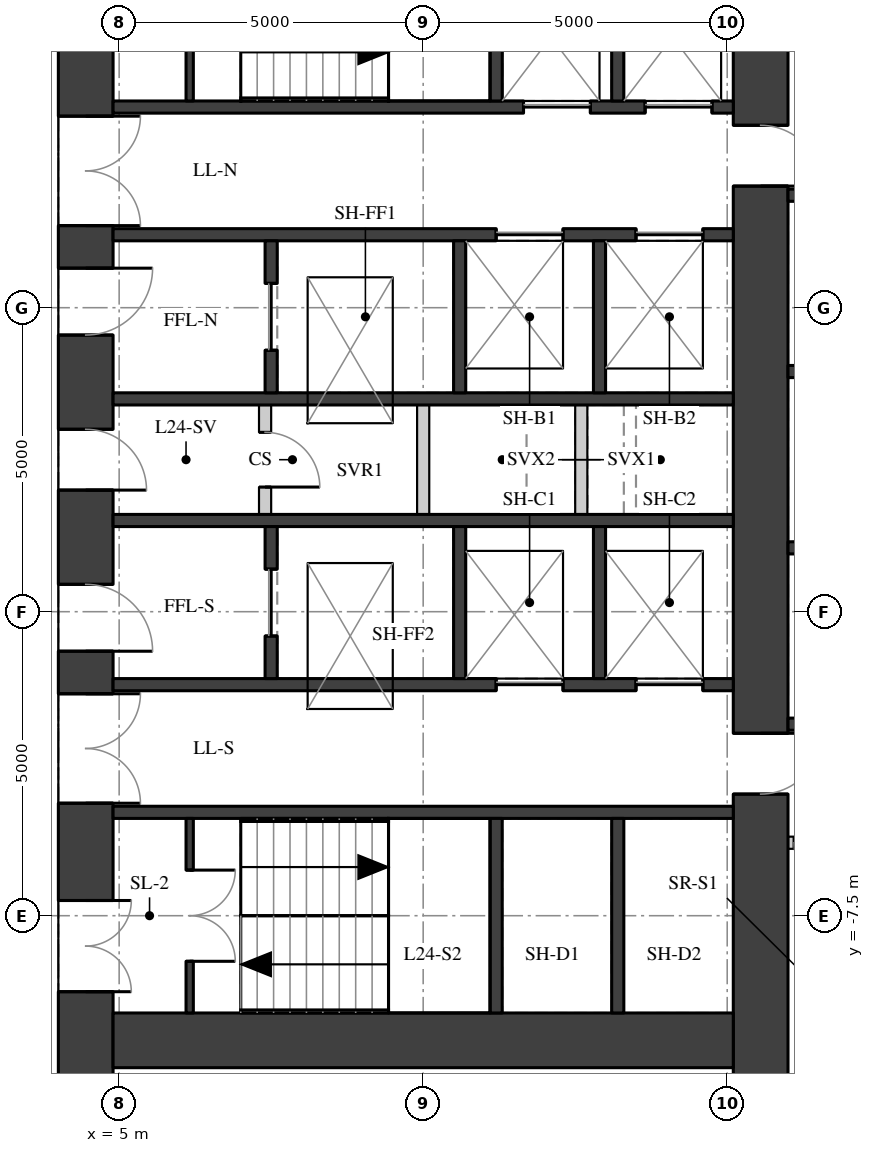
"""IFC4 building model, lengths in metres.
Left out: names, types, materials, properties, quantities, classifications, styles, units other than length and angle.
Written with IfcOpenShell. Run it as: python <this file> out.ifc"""

import sys

from ifc_helpers import new_model, si_unit, direction, frame, frame_2d, origin, place, context, subcontext, project, spatial, rectangle, extrude, element, fill, save


model = new_model("IFC4")
c1 = context("Model", 3, precision=1e-05, world=origin(), true_north=direction((0.0, 1.0)))
c2 = subcontext(c1, "Body", "Model", "MODEL_VIEW")
j1 = project(units=[si_unit("LENGTHUNIT", "METRE"), si_unit("PLANEANGLEUNIT", "RADIAN")], contexts=[c1])
p1 = place(None, origin())
s1 = spatial("IfcSite", under=j1, at=p1, CompositionType="ELEMENT")
p2 = place(p1, origin())
s2 = spatial("IfcBuilding", under=s1, at=p2, CompositionType="ELEMENT")
p3 = place(p2, frame((0.0, 0.0, 88.9)))
s3 = spatial("IfcBuildingStorey", under=s2, at=p3, CompositionType="ELEMENT", Elevation=88.9)
p4 = place(p3, frame((4.45, -11.1, 0.0), z_axis=(0.0, 0.0, 1.0), x_axis=(0.0, 1.0, 0.0)))
e1 = element("IfcWall", 1, at=p4, inside=s3, PredefinedType="SHEAR", context=c2, shape_type="SweptSolid", body=[
    extrude(rectangle(XDim=22.2, YDim=0.9, at=frame_2d((11.1, 0.0))), origin(), (0.0, 0.0, 1.0), 3.02),
])
p5 = place(p4, frame((2.35, 0.0, 0.0)))
e2 = element("IfcOpeningElement", 2, at=p5, cuts=e1, PredefinedType="OPENING", context=c2, shape_type="SweptSolid", body=[
    extrude(rectangle(XDim=1.5, YDim=2.1, at=frame_2d((0.75, 1.05))), frame((0.0, 0.46, 0.0), z_axis=(0.0, -1.0, 0.0), x_axis=(1.0, 0.0, 0.0)), (0.0, 0.0, 1.0), 0.92),
])
p6 = place(p4, frame((5.45, 0.0, 0.0)))
e3 = element("IfcOpeningElement", 3, at=p6, cuts=e1, PredefinedType="OPENING", context=c2, shape_type="SweptSolid", body=[
    extrude(rectangle(XDim=1.8, YDim=2.1, at=frame_2d((0.9, 1.05))), frame((0.0, 0.46, 0.0), z_axis=(0.0, -1.0, 0.0), x_axis=(1.0, 0.0, 0.0)), (0.0, 0.0, 1.0), 0.92),
])
p7 = place(p4, frame((7.95, 0.0, 0.0)))
e4 = element("IfcOpeningElement", 4, at=p7, cuts=e1, PredefinedType="OPENING", context=c2, shape_type="SweptSolid", body=[
    extrude(rectangle(XDim=1.1, YDim=2.1, at=frame_2d((0.55, 1.05))), frame((0.0, 0.46, 0.0), z_axis=(0.0, -1.0, 0.0), x_axis=(1.0, 0.0, 0.0)), (0.0, 0.0, 1.0), 0.92),
])
p8 = place(p4, frame((10.6, 0.0, 0.0)))
e5 = element("IfcOpeningElement", 5, at=p8, cuts=e1, PredefinedType="OPENING", context=c2, shape_type="SweptSolid", body=[
    extrude(rectangle(XDim=1.0, YDim=2.1, at=frame_2d((0.5, 1.05))), frame((0.0, 0.46, 0.0), z_axis=(0.0, -1.0, 0.0), x_axis=(1.0, 0.0, 0.0)), (0.0, 0.0, 1.0), 0.92),
])
p9 = place(p4, frame((13.15, 0.0, 0.0)))
e6 = element("IfcOpeningElement", 6, at=p9, cuts=e1, PredefinedType="OPENING", context=c2, shape_type="SweptSolid", body=[
    extrude(rectangle(XDim=1.1, YDim=2.1, at=frame_2d((0.55, 1.05))), frame((0.0, 0.46, 0.0), z_axis=(0.0, -1.0, 0.0), x_axis=(1.0, 0.0, 0.0)), (0.0, 0.0, 1.0), 0.92),
])
p10 = place(p4, frame((14.95, 0.0, 0.0)))
e7 = element("IfcOpeningElement", 7, at=p10, cuts=e1, PredefinedType="OPENING", context=c2, shape_type="SweptSolid", body=[
    extrude(rectangle(XDim=1.8, YDim=2.1, at=frame_2d((0.9, 1.05))), frame((0.0, 0.46, 0.0), z_axis=(0.0, -1.0, 0.0), x_axis=(1.0, 0.0, 0.0)), (0.0, 0.0, 1.0), 0.92),
])
p11 = place(p4, frame((18.35, 0.0, 0.0)))
e8 = element("IfcOpeningElement", 8, at=p11, cuts=e1, PredefinedType="OPENING", context=c2, shape_type="SweptSolid", body=[
    extrude(rectangle(XDim=1.5, YDim=2.1, at=frame_2d((0.75, 1.05))), frame((0.0, 0.46, 0.0), z_axis=(0.0, -1.0, 0.0), x_axis=(1.0, 0.0, 0.0)), (0.0, 0.0, 1.0), 0.92),
])
p12 = place(p3, frame((15.55, -11.1, 0.0), z_axis=(0.0, 0.0, 1.0), x_axis=(0.0, 1.0, 0.0)))
e9 = element("IfcWall", 9, at=p12, inside=s3, PredefinedType="SHEAR", context=c2, shape_type="SweptSolid", body=[
    extrude(rectangle(XDim=22.2, YDim=0.9, at=frame_2d((11.1, 0.0))), origin(), (0.0, 0.0, 1.0), 3.02),
])
p13 = place(p12, frame((15.6, 0.0, 0.0)))
e10 = element("IfcOpeningElement", 10, at=p13, cuts=e9, PredefinedType="OPENING", context=c2, shape_type="SweptSolid", body=[
    extrude(rectangle(XDim=1.0, YDim=2.1, at=frame_2d((0.5, 1.05))), frame((0.0, 0.46, 0.0), z_axis=(0.0, -1.0, 0.0), x_axis=(1.0, 0.0, 0.0)), (0.0, 0.0, 1.0), 0.92),
])
p14 = place(p12, frame((5.6, 0.0, 0.0)))
e11 = element("IfcOpeningElement", 11, at=p14, cuts=e9, PredefinedType="OPENING", context=c2, shape_type="SweptSolid", body=[
    extrude(rectangle(XDim=1.0, YDim=2.1, at=frame_2d((0.5, 1.05))), frame((0.0, 0.46, 0.0), z_axis=(0.0, -1.0, 0.0), x_axis=(1.0, 0.0, 0.0)), (0.0, 0.0, 1.0), 0.92),
])
p15 = place(p3, frame((4.9, -9.55, 0.0), z_axis=(0.0, 0.0, 1.0), x_axis=(1.0, 0.0, 0.0)))
e12 = element("IfcWall", 12, at=p15, inside=s3, PredefinedType="SHEAR", context=c2, shape_type="SweptSolid", body=[
    extrude(rectangle(XDim=10.2, YDim=0.9, at=frame_2d((5.1, 0.0))), origin(), (0.0, 0.0, 1.0), 3.02),
])
p16 = place(p3, frame((4.9, 5.8, 0.0), z_axis=(0.0, 0.0, 1.0), x_axis=(1.0, 0.0, 0.0)))
e13 = element("IfcWall", 13, at=p16, inside=s3, PredefinedType="SHEAR", context=c2, shape_type="SweptSolid", body=[
    extrude(rectangle(XDim=10.2, YDim=0.2, at=frame_2d((5.1, 0.0))), origin(), (0.0, 0.0, 1.0), 3.02),
])
p17 = place(p16, frame((6.75, 0.0, 0.0)))
e14 = element("IfcOpeningElement", 14, at=p17, cuts=e13, PredefinedType="OPENING", context=c2, shape_type="SweptSolid", body=[
    extrude(rectangle(XDim=1.1, YDim=2.1, at=frame_2d((0.55, 1.05))), frame((0.0, 0.11, 0.0), z_axis=(0.0, -1.0, 0.0), x_axis=(1.0, 0.0, 0.0)), (0.0, 0.0, 1.0), 0.22),
])
p18 = place(p16, frame((8.75, 0.0, 0.0)))
e15 = element("IfcOpeningElement", 15, at=p18, cuts=e13, PredefinedType="OPENING", context=c2, shape_type="SweptSolid", body=[
    extrude(rectangle(XDim=1.1, YDim=2.1, at=frame_2d((0.55, 1.05))), frame((0.0, 0.11, 0.0), z_axis=(0.0, -1.0, 0.0), x_axis=(1.0, 0.0, 0.0)), (0.0, 0.0, 1.0), 0.22),
])
p19 = place(p3, frame((4.9, 3.7, 0.0), z_axis=(0.0, 0.0, 1.0), x_axis=(1.0, 0.0, 0.0)))
e16 = element("IfcWall", 16, at=p19, inside=s3, PredefinedType="SHEAR", context=c2, shape_type="SweptSolid", body=[
    extrude(rectangle(XDim=10.2, YDim=0.2, at=frame_2d((5.1, 0.0))), origin(), (0.0, 0.0, 1.0), 3.02),
])
p20 = place(p19, frame((6.3, 0.0, 0.0)))
e17 = element("IfcOpeningElement", 17, at=p20, cuts=e16, PredefinedType="OPENING", context=c2, shape_type="SweptSolid", body=[
    extrude(rectangle(XDim=1.1, YDim=2.1, at=frame_2d((0.55, 1.05))), frame((0.0, 0.11, 0.0), z_axis=(0.0, -1.0, 0.0), x_axis=(1.0, 0.0, 0.0)), (0.0, 0.0, 1.0), 0.22),
])
p21 = place(p19, frame((8.6, 0.0, 0.0)))
e18 = element("IfcOpeningElement", 18, at=p21, cuts=e16, PredefinedType="OPENING", context=c2, shape_type="SweptSolid", body=[
    extrude(rectangle(XDim=1.1, YDim=2.1, at=frame_2d((0.55, 1.05))), frame((0.0, 0.11, 0.0), z_axis=(0.0, -1.0, 0.0), x_axis=(1.0, 0.0, 0.0)), (0.0, 0.0, 1.0), 0.22),
])
for number, where, z_axis, x_axis in (
    (19, (4.9, 1.0, 0.0), (0.0, 0.0, 1.0), (1.0, 0.0, 0.0)),
    (20, (4.9, -1.0, 0.0), (0.0, 0.0, 1.0), (1.0, 0.0, 0.0)),
):
    element("IfcWall", number, at=place(p3, frame(where, z_axis=z_axis, x_axis=x_axis)), inside=s3, PredefinedType="SHEAR", context=c2, shape_type="SweptSolid", body=[
        extrude(rectangle(XDim=10.2, YDim=0.2, at=frame_2d((5.1, 0.0))), origin(), (0.0, 0.0, 1.0), 3.02),
    ])
p22 = place(p3, frame((4.9, -3.7, 0.0), z_axis=(0.0, 0.0, 1.0), x_axis=(1.0, 0.0, 0.0)))
e21 = element("IfcWall", 21, at=p22, inside=s3, PredefinedType="SHEAR", context=c2, shape_type="SweptSolid", body=[
    extrude(rectangle(XDim=10.2, YDim=0.2, at=frame_2d((5.1, 0.0))), origin(), (0.0, 0.0, 1.0), 3.02),
])
p23 = place(p22, frame((6.3, 0.0, 0.0)))
e22 = element("IfcOpeningElement", 22, at=p23, cuts=e21, PredefinedType="OPENING", context=c2, shape_type="SweptSolid", body=[
    extrude(rectangle(XDim=1.1, YDim=2.1, at=frame_2d((0.55, 1.05))), frame((0.0, 0.11, 0.0), z_axis=(0.0, -1.0, 0.0), x_axis=(1.0, 0.0, 0.0)), (0.0, 0.0, 1.0), 0.22),
])
p24 = place(p22, frame((8.6, 0.0, 0.0)))
e23 = element("IfcOpeningElement", 23, at=p24, cuts=e21, PredefinedType="OPENING", context=c2, shape_type="SweptSolid", body=[
    extrude(rectangle(XDim=1.1, YDim=2.1, at=frame_2d((0.55, 1.05))), frame((0.0, 0.11, 0.0), z_axis=(0.0, -1.0, 0.0), x_axis=(1.0, 0.0, 0.0)), (0.0, 0.0, 1.0), 0.22),
])
p25 = place(p3, frame((4.9, -5.8, 0.0), z_axis=(0.0, 0.0, 1.0), x_axis=(1.0, 0.0, 0.0)))
e24 = element("IfcWall", 24, at=p25, inside=s3, PredefinedType="SHEAR", context=c2, shape_type="SweptSolid", body=[
    extrude(rectangle(XDim=10.2, YDim=0.2, at=frame_2d((5.1, 0.0))), origin(), (0.0, 0.0, 1.0), 3.02),
])
for number, where, z_axis, x_axis in (
    (25, (11.2, 5.9, 0.0), (0.0, 0.0, 1.0), (0.0, 1.0, 0.0)),
    (26, (11.2, -9.1, 0.0), (0.0, 0.0, 1.0), (0.0, 1.0, 0.0)),
    (27, (13.2, 5.9, 0.0), (0.0, 0.0, 1.0), (0.0, 1.0, 0.0)),
    (28, (13.2, -9.1, 0.0), (0.0, 0.0, 1.0), (0.0, 1.0, 0.0)),
):
    element("IfcWall", number, at=place(p3, frame(where, z_axis=z_axis, x_axis=x_axis)), inside=s3, PredefinedType="SHEAR", context=c2, shape_type="SweptSolid", body=[
        extrude(rectangle(XDim=3.2, YDim=0.2, at=frame_2d((1.6, 0.0))), origin(), (0.0, 0.0, 1.0), 3.02),
    ])
p26 = place(p3, frame((7.5, 1.1, 0.0), z_axis=(0.0, 0.0, 1.0), x_axis=(0.0, 1.0, 0.0)))
e29 = element("IfcWall", 29, at=p26, inside=s3, PredefinedType="SHEAR", context=c2, shape_type="SweptSolid", body=[
    extrude(rectangle(XDim=2.5, YDim=0.2, at=frame_2d((1.25, 0.0))), origin(), (0.0, 0.0, 1.0), 3.02),
])
p27 = place(p26, frame((0.7, 0.0, 0.0)))
e30 = element("IfcOpeningElement", 30, at=p27, cuts=e29, PredefinedType="OPENING", context=c2, shape_type="SweptSolid", body=[
    extrude(rectangle(XDim=1.1, YDim=2.1, at=frame_2d((0.55, 1.05))), frame((0.0, 0.11, 0.0), z_axis=(0.0, -1.0, 0.0), x_axis=(1.0, 0.0, 0.0)), (0.0, 0.0, 1.0), 0.22),
])
p28 = place(p3, frame((7.5, -3.6, 0.0), z_axis=(0.0, 0.0, 1.0), x_axis=(0.0, 1.0, 0.0)))
e31 = element("IfcWall", 31, at=p28, inside=s3, PredefinedType="SHEAR", context=c2, shape_type="SweptSolid", body=[
    extrude(rectangle(XDim=2.5, YDim=0.2, at=frame_2d((1.25, 0.0))), origin(), (0.0, 0.0, 1.0), 3.02),
])
p29 = place(p28, frame((0.7, 0.0, 0.0)))
e32 = element("IfcOpeningElement", 32, at=p29, cuts=e31, PredefinedType="OPENING", context=c2, shape_type="SweptSolid", body=[
    extrude(rectangle(XDim=1.1, YDim=2.1, at=frame_2d((0.55, 1.05))), frame((0.0, 0.11, 0.0), z_axis=(0.0, -1.0, 0.0), x_axis=(1.0, 0.0, 0.0)), (0.0, 0.0, 1.0), 0.22),
])
for number, where, z_axis, x_axis in (
    (33, (10.6, 1.1, 0.0), (0.0, 0.0, 1.0), (0.0, 1.0, 0.0)),
    (34, (10.6, -3.6, 0.0), (0.0, 0.0, 1.0), (0.0, 1.0, 0.0)),
    (35, (12.9, 1.1, 0.0), (0.0, 0.0, 1.0), (0.0, 1.0, 0.0)),
    (36, (12.9, -3.6, 0.0), (0.0, 0.0, 1.0), (0.0, 1.0, 0.0)),
):
    element("IfcWall", number, at=place(p3, frame(where, z_axis=z_axis, x_axis=x_axis)), inside=s3, PredefinedType="SHEAR", context=c2, shape_type="SweptSolid", body=[
        extrude(rectangle(XDim=2.5, YDim=0.2, at=frame_2d((1.25, 0.0))), origin(), (0.0, 0.0, 1.0), 3.02),
    ])
p30 = place(p3, frame((6.16, 5.9, 0.0), z_axis=(0.0, 0.0, 1.0), x_axis=(0.0, 1.0, 0.0)))
e37 = element("IfcWall", 37, at=p30, inside=s3, PredefinedType="SHEAR", context=c2, shape_type="SweptSolid", body=[
    extrude(rectangle(XDim=3.2, YDim=0.12, at=frame_2d((1.6, 0.0))), origin(), (0.0, 0.0, 1.0), 3.02),
])
p31 = place(p30, frame((0.85, 0.0, 0.0)))
e38 = element("IfcOpeningElement", 38, at=p31, cuts=e37, PredefinedType="OPENING", context=c2, shape_type="SweptSolid", body=[
    extrude(rectangle(XDim=1.5, YDim=2.1, at=frame_2d((0.75, 1.05))), frame((0.0, 0.07, 0.0), z_axis=(0.0, -1.0, 0.0), x_axis=(1.0, 0.0, 0.0)), (0.0, 0.0, 1.0), 0.14),
])
p32 = place(p3, frame((6.16, -9.1, 0.0), z_axis=(0.0, 0.0, 1.0), x_axis=(0.0, 1.0, 0.0)))
e39 = element("IfcWall", 39, at=p32, inside=s3, PredefinedType="SHEAR", context=c2, shape_type="SweptSolid", body=[
    extrude(rectangle(XDim=3.2, YDim=0.12, at=frame_2d((1.6, 0.0))), origin(), (0.0, 0.0, 1.0), 3.02),
])
p33 = place(p32, frame((0.85, 0.0, 0.0)))
e40 = element("IfcOpeningElement", 40, at=p33, cuts=e39, PredefinedType="OPENING", context=c2, shape_type="SweptSolid", body=[
    extrude(rectangle(XDim=1.5, YDim=2.1, at=frame_2d((0.75, 1.05))), frame((0.0, 0.07, 0.0), z_axis=(0.0, -1.0, 0.0), x_axis=(1.0, 0.0, 0.0)), (0.0, 0.0, 1.0), 0.14),
])
p34 = place(p3, frame((7.4, -0.9, 0.0), z_axis=(0.0, 0.0, 1.0), x_axis=(0.0, 1.0, 0.0)))
e41 = element("IfcWall", 41, at=p34, inside=s3, PredefinedType="PARTITIONING", context=c2, shape_type="SweptSolid", body=[
    extrude(rectangle(XDim=1.8, YDim=0.2, at=frame_2d((0.9, 0.0))), origin(), (0.0, 0.0, 1.0), 3.02),
])
p35 = place(p34, frame((0.45, 0.0, 0.0)))
e42 = element("IfcOpeningElement", 42, at=p35, cuts=e41, PredefinedType="OPENING", context=c2, shape_type="SweptSolid", body=[
    extrude(rectangle(XDim=0.9, YDim=2.1, at=frame_2d((0.45, 1.05))), frame((0.0, 0.11, 0.0), z_axis=(0.0, -1.0, 0.0), x_axis=(1.0, 0.0, 0.0)), (0.0, 0.0, 1.0), 0.22),
])
for number, where, z_axis, x_axis in (
    (43, (10.0, -0.9, 0.0), (0.0, 0.0, 1.0), (0.0, 1.0, 0.0)),
    (44, (12.6, -0.9, 0.0), (0.0, 0.0, 1.0), (0.0, 1.0, 0.0)),
):
    element("IfcWall", number, at=place(p3, frame(where, z_axis=z_axis, x_axis=x_axis)), inside=s3, PredefinedType="PARTITIONING", context=c2, shape_type="SweptSolid", body=[
        extrude(rectangle(XDim=1.8, YDim=0.2, at=frame_2d((0.9, 0.0))), origin(), (0.0, 0.0, 1.0), 3.02),
    ])
for number, where, z_axis, x_axis in (
    (45, (16.0, -4.35, 0.0), (0.0, 0.0, 1.0), (1.0, 0.0, 0.0)),
    (46, (16.0, -1.45, 0.0), (0.0, 0.0, 1.0), (1.0, 0.0, 0.0)),
    (47, (16.0, 1.45, 0.0), (0.0, 0.0, 1.0), (1.0, 0.0, 0.0)),
    (48, (16.0, 4.35, 0.0), (0.0, 0.0, 1.0), (1.0, 0.0, 0.0)),
):
    element("IfcWall", number, at=place(p3, frame(where, z_axis=z_axis, x_axis=x_axis)), inside=s3, PredefinedType="SHEAR", context=c2, shape_type="SweptSolid", body=[
        extrude(rectangle(XDim=2.3, YDim=0.2, at=frame_2d((1.15, 0.0))), origin(), (0.0, 0.0, 1.0), 3.02),
    ])
p36 = place(p3, frame((16.0, -6.3, 0.0), z_axis=(0.0, 0.0, 1.0), x_axis=(1.0, 0.0, 0.0)))
e49 = element("IfcWall", 49, at=p36, inside=s3, PredefinedType="PARTITIONING", context=c2, shape_type="SweptSolid", body=[
    extrude(rectangle(XDim=2.3, YDim=0.2, at=frame_2d((1.15, 0.0))), origin(), (0.0, 0.0, 1.0), 3.02),
])
p37 = place(p36, frame((0.1, 0.0, 0.0)))
e50 = element("IfcOpeningElement", 50, at=p37, cuts=e49, PredefinedType="OPENING", context=c2, shape_type="SweptSolid", body=[
    extrude(rectangle(XDim=0.9, YDim=2.1, at=frame_2d((0.45, 1.05))), frame((0.0, 0.11, 0.0), z_axis=(0.0, -1.0, 0.0), x_axis=(1.0, 0.0, 0.0)), (0.0, 0.0, 1.0), 0.22),
])
p38 = place(p5, origin())
e51 = element("IfcDoor", 51, at=p38, inside=s3, OperationType="DOUBLE_DOOR_SINGLE_SWING", PredefinedType="DOOR", context=c2, shape_type="SweptSolid", body=[
    extrude(rectangle(XDim=1.5, YDim=2.1, at=frame_2d((0.75, 1.05))), frame((0.0, 0.025, 0.0), z_axis=(0.0, -1.0, 0.0), x_axis=(1.0, 0.0, 0.0)), (0.0, 0.0, 1.0), 0.05),
])
fill(e2, e51)
p39 = place(p6, origin())
e52 = element("IfcDoor", 52, at=p39, inside=s3, OperationType="DOUBLE_DOOR_SINGLE_SWING", PredefinedType="DOOR", context=c2, shape_type="SweptSolid", body=[
    extrude(rectangle(XDim=1.8, YDim=2.1, at=frame_2d((0.9, 1.05))), frame((0.0, 0.025, 0.0), z_axis=(0.0, -1.0, 0.0), x_axis=(1.0, 0.0, 0.0)), (0.0, 0.0, 1.0), 0.05),
])
fill(e3, e52)
p40 = place(p7, origin())
e53 = element("IfcDoor", 53, at=p40, inside=s3, OperationType="SINGLE_SWING_RIGHT", PredefinedType="DOOR", context=c2, shape_type="SweptSolid", body=[
    extrude(rectangle(XDim=1.1, YDim=2.1, at=frame_2d((0.55, 1.05))), frame((0.0, 0.025, 0.0), z_axis=(0.0, -1.0, 0.0), x_axis=(1.0, 0.0, 0.0)), (0.0, 0.0, 1.0), 0.05),
])
fill(e4, e53)
p41 = place(p8, origin())
e54 = element("IfcDoor", 54, at=p41, inside=s3, OperationType="SINGLE_SWING_RIGHT", PredefinedType="DOOR", context=c2, shape_type="SweptSolid", body=[
    extrude(rectangle(XDim=1.0, YDim=2.1, at=frame_2d((0.5, 1.05))), frame((0.0, 0.025, 0.0), z_axis=(0.0, -1.0, 0.0), x_axis=(1.0, 0.0, 0.0)), (0.0, 0.0, 1.0), 0.05),
])
fill(e5, e54)
p42 = place(p9, origin())
e55 = element("IfcDoor", 55, at=p42, inside=s3, OperationType="SINGLE_SWING_LEFT", PredefinedType="DOOR", context=c2, shape_type="SweptSolid", body=[
    extrude(rectangle(XDim=1.1, YDim=2.1, at=frame_2d((0.55, 1.05))), frame((0.0, 0.025, 0.0), z_axis=(0.0, -1.0, 0.0), x_axis=(1.0, 0.0, 0.0)), (0.0, 0.0, 1.0), 0.05),
])
fill(e6, e55)
p43 = place(p10, origin())
e56 = element("IfcDoor", 56, at=p43, inside=s3, OperationType="DOUBLE_DOOR_SINGLE_SWING", PredefinedType="DOOR", context=c2, shape_type="SweptSolid", body=[
    extrude(rectangle(XDim=1.8, YDim=2.1, at=frame_2d((0.9, 1.05))), frame((0.0, 0.025, 0.0), z_axis=(0.0, -1.0, 0.0), x_axis=(1.0, 0.0, 0.0)), (0.0, 0.0, 1.0), 0.05),
])
fill(e7, e56)
p44 = place(p33, origin())
e57 = element("IfcDoor", 57, at=p44, inside=s3, OperationType="DOUBLE_DOOR_SINGLE_SWING", PredefinedType="DOOR", context=c2, shape_type="SweptSolid", body=[
    extrude(rectangle(XDim=1.5, YDim=2.1, at=frame_2d((0.75, 1.05))), frame((0.0, 0.025, 0.0), z_axis=(0.0, -1.0, 0.0), x_axis=(1.0, 0.0, 0.0)), (0.0, 0.0, 1.0), 0.05),
])
fill(e40, e57)
p45 = place(p17, origin())
e58 = element("IfcDoor", 58, at=p45, inside=s3, OperationType="DOUBLE_DOOR_SLIDING", PredefinedType="DOOR", context=c2, shape_type="SweptSolid", body=[
    extrude(rectangle(XDim=1.1, YDim=2.1, at=frame_2d((0.55, 1.05))), frame((0.0, 0.025, 0.0), z_axis=(0.0, -1.0, 0.0), x_axis=(1.0, 0.0, 0.0)), (0.0, 0.0, 1.0), 0.05),
])
fill(e14, e58)
p46 = place(p18, origin())
e59 = element("IfcDoor", 59, at=p46, inside=s3, OperationType="DOUBLE_DOOR_SLIDING", PredefinedType="DOOR", context=c2, shape_type="SweptSolid", body=[
    extrude(rectangle(XDim=1.1, YDim=2.1, at=frame_2d((0.55, 1.05))), frame((0.0, 0.025, 0.0), z_axis=(0.0, -1.0, 0.0), x_axis=(1.0, 0.0, 0.0)), (0.0, 0.0, 1.0), 0.05),
])
fill(e15, e59)
p47 = place(p20, origin())
e60 = element("IfcDoor", 60, at=p47, inside=s3, OperationType="DOUBLE_DOOR_SLIDING", PredefinedType="DOOR", context=c2, shape_type="SweptSolid", body=[
    extrude(rectangle(XDim=1.1, YDim=2.1, at=frame_2d((0.55, 1.05))), frame((0.0, 0.025, 0.0), z_axis=(0.0, -1.0, 0.0), x_axis=(1.0, 0.0, 0.0)), (0.0, 0.0, 1.0), 0.05),
])
fill(e17, e60)
p48 = place(p21, origin())
e61 = element("IfcDoor", 61, at=p48, inside=s3, OperationType="DOUBLE_DOOR_SLIDING", PredefinedType="DOOR", context=c2, shape_type="SweptSolid", body=[
    extrude(rectangle(XDim=1.1, YDim=2.1, at=frame_2d((0.55, 1.05))), frame((0.0, 0.025, 0.0), z_axis=(0.0, -1.0, 0.0), x_axis=(1.0, 0.0, 0.0)), (0.0, 0.0, 1.0), 0.05),
])
fill(e18, e61)
p49 = place(p23, origin())
e62 = element("IfcDoor", 62, at=p49, inside=s3, OperationType="DOUBLE_DOOR_SLIDING", PredefinedType="DOOR", context=c2, shape_type="SweptSolid", body=[
    extrude(rectangle(XDim=1.1, YDim=2.1, at=frame_2d((0.55, 1.05))), frame((0.0, 0.025, 0.0), z_axis=(0.0, -1.0, 0.0), x_axis=(1.0, 0.0, 0.0)), (0.0, 0.0, 1.0), 0.05),
])
fill(e22, e62)
p50 = place(p24, origin())
e63 = element("IfcDoor", 63, at=p50, inside=s3, OperationType="DOUBLE_DOOR_SLIDING", PredefinedType="DOOR", context=c2, shape_type="SweptSolid", body=[
    extrude(rectangle(XDim=1.1, YDim=2.1, at=frame_2d((0.55, 1.05))), frame((0.0, 0.025, 0.0), z_axis=(0.0, -1.0, 0.0), x_axis=(1.0, 0.0, 0.0)), (0.0, 0.0, 1.0), 0.05),
])
fill(e23, e63)
p51 = place(p27, origin())
e64 = element("IfcDoor", 64, at=p51, inside=s3, OperationType="DOUBLE_DOOR_SLIDING", PredefinedType="DOOR", context=c2, shape_type="SweptSolid", body=[
    extrude(rectangle(XDim=1.1, YDim=2.1, at=frame_2d((0.55, 1.05))), frame((0.0, 0.025, 0.0), z_axis=(0.0, -1.0, 0.0), x_axis=(1.0, 0.0, 0.0)), (0.0, 0.0, 1.0), 0.05),
])
fill(e30, e64)
p52 = place(p29, origin())
e65 = element("IfcDoor", 65, at=p52, inside=s3, OperationType="DOUBLE_DOOR_SLIDING", PredefinedType="DOOR", context=c2, shape_type="SweptSolid", body=[
    extrude(rectangle(XDim=1.1, YDim=2.1, at=frame_2d((0.55, 1.05))), frame((0.0, 0.025, 0.0), z_axis=(0.0, -1.0, 0.0), x_axis=(1.0, 0.0, 0.0)), (0.0, 0.0, 1.0), 0.05),
])
fill(e32, e65)
p53 = place(p35, origin())
e66 = element("IfcDoor", 66, at=p53, inside=s3, OperationType="SINGLE_SWING_RIGHT", PredefinedType="DOOR", context=c2, shape_type="SweptSolid", body=[
    extrude(rectangle(XDim=0.9, YDim=2.1, at=frame_2d((0.45, 1.05))), frame((0.0, 0.025, 0.0), z_axis=(0.0, -1.0, 0.0), x_axis=(1.0, 0.0, 0.0)), (0.0, 0.0, 1.0), 0.05),
])
fill(e42, e66)
p54 = place(p13, origin())
e67 = element("IfcDoor", 67, at=p54, inside=s3, OperationType="SINGLE_SWING_RIGHT", PredefinedType="DOOR", context=c2, shape_type="SweptSolid", body=[
    extrude(rectangle(XDim=1.0, YDim=2.1, at=frame_2d((0.5, 1.05))), frame((0.0, 0.025, 0.0), z_axis=(0.0, -1.0, 0.0), x_axis=(1.0, 0.0, 0.0)), (0.0, 0.0, 1.0), 0.05),
])
fill(e10, e67)
p55 = place(p14, origin())
e68 = element("IfcDoor", 68, at=p55, inside=s3, OperationType="SINGLE_SWING_LEFT", PredefinedType="DOOR", context=c2, shape_type="SweptSolid", body=[
    extrude(rectangle(XDim=1.0, YDim=2.1, at=frame_2d((0.5, 1.05))), frame((0.0, 0.025, 0.0), z_axis=(0.0, -1.0, 0.0), x_axis=(1.0, 0.0, 0.0)), (0.0, 0.0, 1.0), 0.05),
])
fill(e11, e68)
save(model, sys.argv[1])
